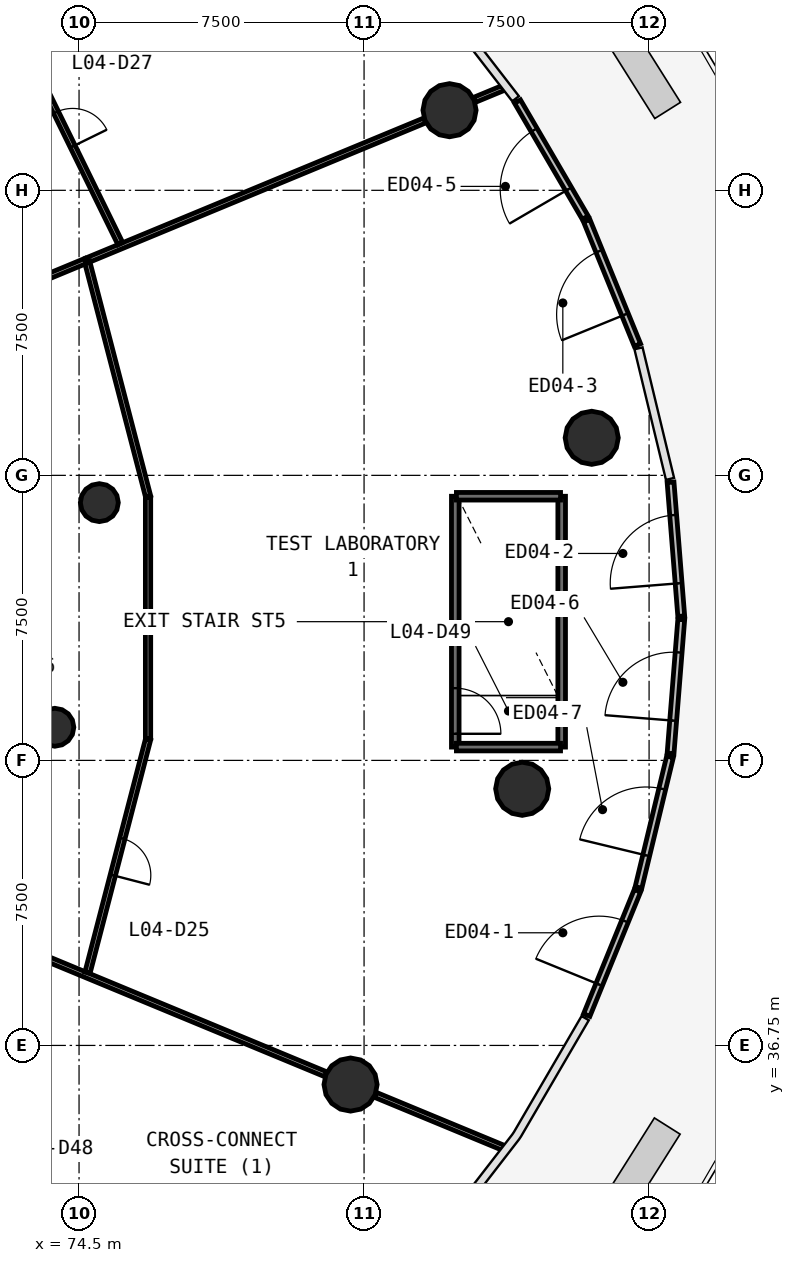
"""IFC4 building model, lengths in metres.
Left out: names, types, materials, properties, quantities, classifications, styles, units other than length and angle.
Written with IfcOpenShell. Run it as: python <this file> out.ifc"""

import sys

from ifc_helpers import new_model, si_unit, direction, frame, frame_2d, origin, origin_2d, place, context, subcontext, project, spatial, rectangle, circle, extrude, source, transform, mapped, element, fill, save


model = new_model("IFC4")
c1 = context("Model", 3, precision=1e-05, world=origin(), true_north=direction((0.0, 1.0)))
c2 = subcontext(c1, "Body", "Model", "MODEL_VIEW")
j1 = project(units=[si_unit("LENGTHUNIT", "METRE"), si_unit("PLANEANGLEUNIT", "RADIAN")], contexts=[c1])
p1 = place(None, origin())
s1 = spatial("IfcSite", under=j1, at=p1, CompositionType="ELEMENT")
p2 = place(p1, origin())
s2 = spatial("IfcBuilding", under=s1, at=p2, CompositionType="ELEMENT")
p3 = place(p2, frame((0.0, 0.0, 18.2)))
s3 = spatial("IfcBuildingStorey", under=s2, at=p3, CompositionType="ELEMENT", Elevation=18.2)
m1 = source(origin(), c2, "Body", "SweptSolid", [
    extrude(circle(Radius=0.7, at=origin_2d()), origin(), (0.0, 0.0, 1.0), 4.4),
])
for number, where, z_axis, x_axis in (
    (1, (87.99, 52.738, 0.0), (0.0, 0.0, 1.0), (1.0, 0.0, 0.0)),
    (2, (84.249, 61.358, 0.0), (0.0, 0.0, 1.0), (1.0, 0.0, 0.0)),
    (3, (81.645, 35.721, 0.0), (0.0, 0.0, 1.0), (1.0, 0.0, 0.0)),
    (4, (86.161, 43.503, 0.0), (0.0, 0.0, 1.0), (1.0, 0.0, 0.0)),
):
    element("IfcColumn", number, at=place(p3, frame(where, z_axis=z_axis, x_axis=x_axis)), inside=s3, PredefinedType="COLUMN", context=c2, shape_type="MappedRepresentation", body=[
        mapped(m1, transform((0.0, 0.0, 0.0), scale=1.0)),
    ])
m2 = source(origin(), c2, "Body", "SweptSolid", [
    extrude(circle(Radius=0.5, at=origin_2d()), origin(), (0.0, 0.0, 1.0), 4.4),
])
for number, where, z_axis, x_axis in (
    (5, (75.034, 51.032, 0.0), (0.0, 0.0, 1.0), (1.0, 0.0, 0.0)),
    (6, (73.863, 45.122, 0.0), (0.0, 0.0, 1.0), (1.0, 0.0, 0.0)),
):
    element("IfcColumn", number, at=place(p3, frame(where, z_axis=z_axis, x_axis=x_axis)), inside=s3, PredefinedType="COLUMN", context=c2, shape_type="MappedRepresentation", body=[
        mapped(m2, transform((0.0, 0.0, 0.0), scale=1.0)),
    ])
p4 = place(p3, frame((90.346, 48.045, 0.0), z_axis=(0.0, 0.0, 1.0), x_axis=(-0.079643640775, 0.996823399848, 0.0)))
e7 = element("IfcWall", 7, at=p4, inside=s3, PredefinedType="STANDARD", context=c2, shape_type="SweptSolid", body=[
    extrude(rectangle(XDim=3.534, YDim=0.18, at=frame_2d((1.767, 0.0))), origin(), (0.0, 0.0, 1.0), 3.95),
])
p5 = place(p4, frame((0.867, 0.0, 0.0)))
e8 = element("IfcOpeningElement", 8, at=p5, cuts=e7, PredefinedType="OPENING", context=c2, shape_type="SweptSolid", body=[
    extrude(rectangle(XDim=1.8, YDim=2.4, at=frame_2d((0.9, 1.2))), frame((0.0, 0.1, 0.0), z_axis=(0.0, -1.0, 0.0), x_axis=(1.0, 0.0, 0.0)), (0.0, 0.0, 1.0), 0.2),
])
p6 = place(p3, frame((89.194, 55.178, 0.0), z_axis=(0.0, 0.0, 1.0), x_axis=(-0.377704890436, 0.925926031463, 0.0)))
e9 = element("IfcWall", 9, at=p6, inside=s3, PredefinedType="STANDARD", context=c2, shape_type="SweptSolid", body=[
    extrude(rectangle(XDim=3.535, YDim=0.18, at=frame_2d((1.768, 0.0))), origin(), (0.0, 0.0, 1.0), 3.95),
])
p7 = place(p6, frame((0.867, 0.0, 0.0)))
e10 = element("IfcOpeningElement", 10, at=p7, cuts=e9, PredefinedType="OPENING", context=c2, shape_type="SweptSolid", body=[
    extrude(rectangle(XDim=1.8, YDim=2.4, at=frame_2d((0.9, 1.2))), frame((0.0, 0.1, 0.0), z_axis=(0.0, -1.0, 0.0), x_axis=(1.0, 0.0, 0.0)), (0.0, 0.0, 1.0), 0.2),
])
p8 = place(p3, frame((87.819, 58.532, 0.0), z_axis=(0.0, 0.0, 1.0), x_axis=(-0.50395689343, 0.863728805566, 0.0)))
e11 = element("IfcWall", 11, at=p8, inside=s3, PredefinedType="STANDARD", context=c2, shape_type="SweptSolid", body=[
    extrude(rectangle(XDim=3.535, YDim=0.18, at=frame_2d((1.768, 0.0))), origin(), (0.0, 0.0, 1.0), 3.95),
])
p9 = place(p8, frame((0.868, 0.0, 0.0)))
e12 = element("IfcOpeningElement", 12, at=p9, cuts=e11, PredefinedType="OPENING", context=c2, shape_type="SweptSolid", body=[
    extrude(rectangle(XDim=1.8, YDim=2.4, at=frame_2d((0.9, 1.2))), frame((0.0, 0.1, 0.0), z_axis=(0.0, -1.0, 0.0), x_axis=(1.0, 0.0, 0.0)), (0.0, 0.0, 1.0), 0.2),
])
p10 = place(p3, frame((87.859, 37.549, 0.0), z_axis=(0.0, 0.0, 1.0), x_axis=(0.377704890436, 0.925926031463, 0.0)))
e13 = element("IfcWall", 13, at=p10, inside=s3, PredefinedType="STANDARD", context=c2, shape_type="SweptSolid", body=[
    extrude(rectangle(XDim=3.535, YDim=0.18, at=frame_2d((1.768, 0.0))), origin(), (0.0, 0.0, 1.0), 3.95),
])
p11 = place(p10, frame((0.867, 0.0, 0.0)))
e14 = element("IfcOpeningElement", 14, at=p11, cuts=e13, PredefinedType="OPENING", context=c2, shape_type="SweptSolid", body=[
    extrude(rectangle(XDim=1.8, YDim=2.4, at=frame_2d((0.9, 1.2))), frame((0.0, 0.1, 0.0), z_axis=(0.0, -1.0, 0.0), x_axis=(1.0, 0.0, 0.0)), (0.0, 0.0, 1.0), 0.2),
])
p12 = place(p3, frame((89.222, 40.907, 0.0), z_axis=(0.0, 0.0, 1.0), x_axis=(0.234564011382, 0.972100676146, 0.0)))
e15 = element("IfcWall", 15, at=p12, inside=s3, PredefinedType="STANDARD", context=c2, shape_type="SweptSolid", body=[
    extrude(rectangle(XDim=3.535, YDim=0.18, at=frame_2d((1.767, 0.0))), origin(), (0.0, 0.0, 1.0), 3.591),
])
p13 = place(p12, frame((0.867, 0.0, 0.0)))
e16 = element("IfcOpeningElement", 16, at=p13, cuts=e15, PredefinedType="OPENING", context=c2, shape_type="SweptSolid", body=[
    extrude(rectangle(XDim=1.8, YDim=2.4, at=frame_2d((0.9, 1.2))), frame((0.0, 0.1, 0.0), z_axis=(0.0, -1.0, 0.0), x_axis=(1.0, 0.0, 0.0)), (0.0, 0.0, 1.0), 0.2),
])
p14 = place(p3, frame((90.065, 44.432, 0.0), z_axis=(0.0, 0.0, 1.0), x_axis=(0.079643640775, 0.996823399848, 0.0)))
e17 = element("IfcWall", 17, at=p14, inside=s3, PredefinedType="STANDARD", context=c2, shape_type="SweptSolid", body=[
    extrude(rectangle(XDim=3.534, YDim=0.18, at=frame_2d((1.767, 0.0))), origin(), (0.0, 0.0, 1.0), 3.95),
])
p15 = place(p14, frame((0.867, 0.0, 0.0)))
e18 = element("IfcOpeningElement", 18, at=p15, cuts=e17, PredefinedType="OPENING", context=c2, shape_type="SweptSolid", body=[
    extrude(rectangle(XDim=1.8, YDim=2.4, at=frame_2d((0.9, 1.2))), frame((0.0, 0.1, 0.0), z_axis=(0.0, -1.0, 0.0), x_axis=(1.0, 0.0, 0.0)), (0.0, 0.0, 1.0), 0.2),
])
p16 = place(p3, frame((87.2, 44.6, 0.0), z_axis=(0.0, 0.0, 1.0), x_axis=(0.0, 1.0, 0.0)))
e19 = element("IfcWall", 19, at=p16, inside=s3, PredefinedType="SOLIDWALL", context=c2, shape_type="SweptSolid", body=[
    extrude(rectangle(XDim=6.6, YDim=0.2, at=frame_2d((3.3, 0.0))), origin(), (0.0, 0.0, 1.0), 3.95),
])
p17 = place(p3, frame((84.4, 51.2, 0.0), z_axis=(0.0, 0.0, 1.0), x_axis=(0.0, -1.0, 0.0)))
e20 = element("IfcWall", 20, at=p17, inside=s3, PredefinedType="SOLIDWALL", context=c2, shape_type="SweptSolid", body=[
    extrude(rectangle(XDim=6.6, YDim=0.2, at=frame_2d((3.3, 0.0))), origin(), (0.0, 0.0, 1.0), 3.95),
])
p18 = place(p17, frame((5.05, 0.0, 0.0)))
e21 = element("IfcOpeningElement", 21, at=p18, cuts=e20, PredefinedType="OPENING", context=c2, shape_type="SweptSolid", body=[
    extrude(rectangle(XDim=1.2, YDim=2.1, at=frame_2d((0.6, 1.05))), frame((0.0, 0.11, 0.0), z_axis=(0.0, -1.0, 0.0), x_axis=(1.0, 0.0, 0.0)), (0.0, 0.0, 1.0), 0.22),
])
for number, where, z_axis, x_axis in (
    (22, (84.43, 44.6, 0.0), (0.0, 0.0, 1.0), (1.0, 0.0, 0.0)),
    (23, (87.17, 51.2, 0.0), (0.0, 0.0, 1.0), (-1.0, 0.0, 0.0)),
):
    element("IfcWall", number, at=place(p3, frame(where, z_axis=z_axis, x_axis=x_axis)), inside=s3, PredefinedType="SOLIDWALL", context=c2, shape_type="SweptSolid", body=[
        extrude(rectangle(XDim=2.74, YDim=0.2, at=frame_2d((1.37, 0.0))), origin(), (0.0, 0.0, 1.0), 3.95),
    ])
p19 = place(p3, frame((74.704, 57.404, 0.0), z_axis=(0.0, 0.0, 1.0), x_axis=(0.923875564014, 0.382693013024, 0.0)))
e24 = element("IfcWall", 24, at=p19, inside=s3, PredefinedType="PARTITIONING", context=c2, shape_type="SweptSolid", body=[
    extrude(rectangle(XDim=9.626, YDim=0.14, at=frame_2d((4.813, 0.0))), origin(), (0.0, 0.0, 1.0), 3.15),
])
p20 = place(p3, frame((73.613, 39.048, 0.0), z_axis=(0.0, 0.0, 1.0), x_axis=(0.923869702123, -0.382707164159, 0.0)))
e25 = element("IfcWall", 25, at=p20, inside=s3, PredefinedType="PARTITIONING", context=c2, shape_type="SweptSolid", body=[
    extrude(rectangle(XDim=7.989, YDim=0.14, at=frame_2d((3.994, 0.0))), origin(), (0.0, 0.0, 1.0), 3.15),
])
p21 = place(p3, frame((72.66, 63.816, 0.0), z_axis=(0.0, 0.0, 1.0), x_axis=(0.44010555344, -0.897946046169, 0.0)))
e26 = element("IfcWall", 26, at=p21, inside=s3, PredefinedType="PARTITIONING", context=c2, shape_type="SweptSolid", body=[
    extrude(rectangle(XDim=6.649, YDim=0.14, at=frame_2d((3.324, 0.0))), origin(), (0.0, 0.0, 1.0), 3.15),
])
p22 = place(p21, frame((2.799, 0.0, 0.0)))
e27 = element("IfcOpeningElement", 27, at=p22, cuts=e26, PredefinedType="OPENING", context=c2, shape_type="SweptSolid", body=[
    extrude(rectangle(XDim=1.0, YDim=2.1, at=frame_2d((0.5, 1.05))), frame((0.0, 0.08, 0.0), z_axis=(0.0, -1.0, 0.0), x_axis=(1.0, 0.0, 0.0)), (0.0, 0.0, 1.0), 0.16),
])
p23 = place(p3, frame((76.316, 51.201, 0.0), z_axis=(0.0, 0.0, 1.0), x_axis=(-0.251404417417, 0.967882130687, 0.0)))
e28 = element("IfcWall", 28, at=p23, inside=s3, PredefinedType="PARTITIONING", context=c2, shape_type="SweptSolid", body=[
    extrude(rectangle(XDim=6.379, YDim=0.14, at=frame_2d((3.189, 0.0))), origin(), (0.0, 0.0, 1.0), 3.15),
])
p24 = place(p3, frame((76.316, 44.799, 0.0), z_axis=(0.0, 0.0, 1.0), x_axis=(-0.251407268144, -0.967881390215, 0.0)))
e29 = element("IfcWall", 29, at=p24, inside=s3, PredefinedType="PARTITIONING", context=c2, shape_type="SweptSolid", body=[
    extrude(rectangle(XDim=6.338, YDim=0.14, at=frame_2d((3.169, 0.0))), origin(), (0.0, 0.0, 1.0), 3.15),
])
p25 = place(p24, frame((2.688, 0.0, 0.0)))
e30 = element("IfcOpeningElement", 30, at=p25, cuts=e29, PredefinedType="OPENING", context=c2, shape_type="SweptSolid", body=[
    extrude(rectangle(XDim=1.0, YDim=2.1, at=frame_2d((0.5, 1.05))), frame((0.0, 0.08, 0.0), z_axis=(0.0, -1.0, 0.0), x_axis=(1.0, 0.0, 0.0)), (0.0, 0.0, 1.0), 0.16),
])
p26 = place(p3, frame((76.316, 44.829, 0.0), z_axis=(0.0, 0.0, 1.0), x_axis=(0.0, 1.0, 0.0)))
e31 = element("IfcWall", 31, at=p26, inside=s3, PredefinedType="PARTITIONING", context=c2, shape_type="SweptSolid", body=[
    extrude(rectangle(XDim=6.342, YDim=0.14, at=frame_2d((3.171, 0.0))), origin(), (0.0, 0.0, 1.0), 3.15),
])
p27 = place(p3, frame((71.391, 33.121, 0.0), z_axis=(0.0, 0.0, 1.0), x_axis=(0.79336750658, -0.608742966697, 0.0)))
e32 = element("IfcWall", 32, at=p27, inside=s3, PredefinedType="PARTITIONING", context=c2, shape_type="SweptSolid", body=[
    extrude(rectangle(XDim=4.854, YDim=0.14, at=frame_2d((2.427, 0.0))), origin(), (0.0, 0.0, 1.0), 3.15),
])
p28 = place(p3, frame((82.296, 35.451, 0.0), z_axis=(0.0, 0.0, 1.0), x_axis=(0.923882033439, -0.382677394537, 0.0)))
e33 = element("IfcWall", 33, at=p28, inside=s3, PredefinedType="PARTITIONING", context=c2, shape_type="SweptSolid", body=[
    extrude(rectangle(XDim=3.642, YDim=0.14, at=frame_2d((1.821, 0.0))), origin(), (0.0, 0.0, 1.0), 3.15),
])
p29 = place(p3, frame((73.106, 56.742, 0.0), z_axis=(0.0, 0.0, 1.0), x_axis=(0.923810256597, 0.38285063642, 0.0)))
e34 = element("IfcWall", 34, at=p29, inside=s3, PredefinedType="PARTITIONING", context=c2, shape_type="SweptSolid", body=[
    extrude(rectangle(XDim=1.7, YDim=0.14, at=frame_2d((0.85, 0.0))), origin(), (0.0, 0.0, 1.0), 3.15),
])
p30 = place(p3, frame((84.9, 61.628, 0.0), z_axis=(0.0, 0.0, 1.0), x_axis=(0.923846977396, 0.382762017913, 0.0)))
e35 = element("IfcWall", 35, at=p30, inside=s3, PredefinedType="PARTITIONING", context=c2, shape_type="SweptSolid", body=[
    extrude(rectangle(XDim=0.823, YDim=0.14, at=frame_2d((0.412, 0.0))), origin(), (0.0, 0.0, 1.0), 3.15),
])
m3 = source(origin(), c2, "Body", "SweptSolid", [
    extrude(rectangle(XDim=1.8, YDim=2.4, at=frame_2d((0.9, 1.2))), frame((0.0, 0.025, 0.0), z_axis=(0.0, -1.0, 0.0), x_axis=(1.0, 0.0, 0.0)), (0.0, 0.0, 1.0), 0.05),
])
p31 = place(p5, origin())
e36 = element("IfcDoor", 36, at=p31, inside=s3, OperationType="DOUBLE_DOOR_SINGLE_SWING", PredefinedType="DOOR", context=c2, shape_type="MappedRepresentation", body=[
    mapped(m3, transform((0.0, 0.0, 0.0), scale=1.0)),
])
fill(e8, e36)
p32 = place(p7, origin())
e37 = element("IfcDoor", 37, at=p32, inside=s3, OperationType="DOUBLE_DOOR_SINGLE_SWING", PredefinedType="DOOR", context=c2, shape_type="MappedRepresentation", body=[
    mapped(m3, transform((0.0, 0.0, 0.0), scale=1.0)),
])
fill(e10, e37)
p33 = place(p9, origin())
e38 = element("IfcDoor", 38, at=p33, inside=s3, OperationType="DOUBLE_DOOR_SINGLE_SWING", PredefinedType="DOOR", context=c2, shape_type="MappedRepresentation", body=[
    mapped(m3, transform((0.0, 0.0, 0.0), scale=1.0)),
])
fill(e12, e38)
p34 = place(p11, origin())
e39 = element("IfcDoor", 39, at=p34, inside=s3, OperationType="DOUBLE_DOOR_SINGLE_SWING", PredefinedType="DOOR", context=c2, shape_type="MappedRepresentation", body=[
    mapped(m3, transform((0.0, 0.0, 0.0), scale=1.0)),
])
fill(e14, e39)
p35 = place(p13, origin())
e40 = element("IfcDoor", 40, at=p35, inside=s3, OperationType="DOUBLE_DOOR_SINGLE_SWING", PredefinedType="DOOR", context=c2, shape_type="MappedRepresentation", body=[
    mapped(m3, transform((0.0, 0.0, 0.0), scale=1.0)),
])
fill(e16, e40)
p36 = place(p15, origin())
e41 = element("IfcDoor", 41, at=p36, inside=s3, OperationType="DOUBLE_DOOR_SINGLE_SWING", PredefinedType="DOOR", context=c2, shape_type="MappedRepresentation", body=[
    mapped(m3, transform((0.0, 0.0, 0.0), scale=1.0)),
])
fill(e18, e41)
m4 = source(origin(), c2, "Body", "SweptSolid", [
    extrude(rectangle(XDim=1.0, YDim=2.1, at=frame_2d((0.5, 1.05))), frame((0.0, 0.025, 0.0), z_axis=(0.0, -1.0, 0.0), x_axis=(1.0, 0.0, 0.0)), (0.0, 0.0, 1.0), 0.05),
])
p37 = place(p25, origin())
e42 = element("IfcDoor", 42, at=p37, inside=s3, OperationType="SINGLE_SWING_RIGHT", PredefinedType="DOOR", context=c2, shape_type="MappedRepresentation", body=[
    mapped(m4, transform((0.0, 0.0, 0.0), scale=1.0)),
])
fill(e30, e42)
p38 = place(p22, origin())
e43 = element("IfcDoor", 43, at=p38, inside=s3, OperationType="SINGLE_SWING_RIGHT", PredefinedType="DOOR", context=c2, shape_type="MappedRepresentation", body=[
    mapped(m4, transform((0.0, 0.0, 0.0), scale=1.0)),
])
fill(e27, e43)
m5 = source(origin(), c2, "Body", "SweptSolid", [
    extrude(rectangle(XDim=1.2, YDim=2.1, at=frame_2d((0.6, 1.05))), frame((0.0, 0.025, 0.0), z_axis=(0.0, -1.0, 0.0), x_axis=(1.0, 0.0, 0.0)), (0.0, 0.0, 1.0), 0.05),
])
p39 = place(p18, origin())
e44 = element("IfcDoor", 44, at=p39, inside=s3, OperationType="SINGLE_SWING_RIGHT", PredefinedType="DOOR", context=c2, shape_type="MappedRepresentation", body=[
    mapped(m5, transform((0.0, 0.0, 0.0), scale=1.0)),
])
fill(e21, e44)
save(model, sys.argv[1])
